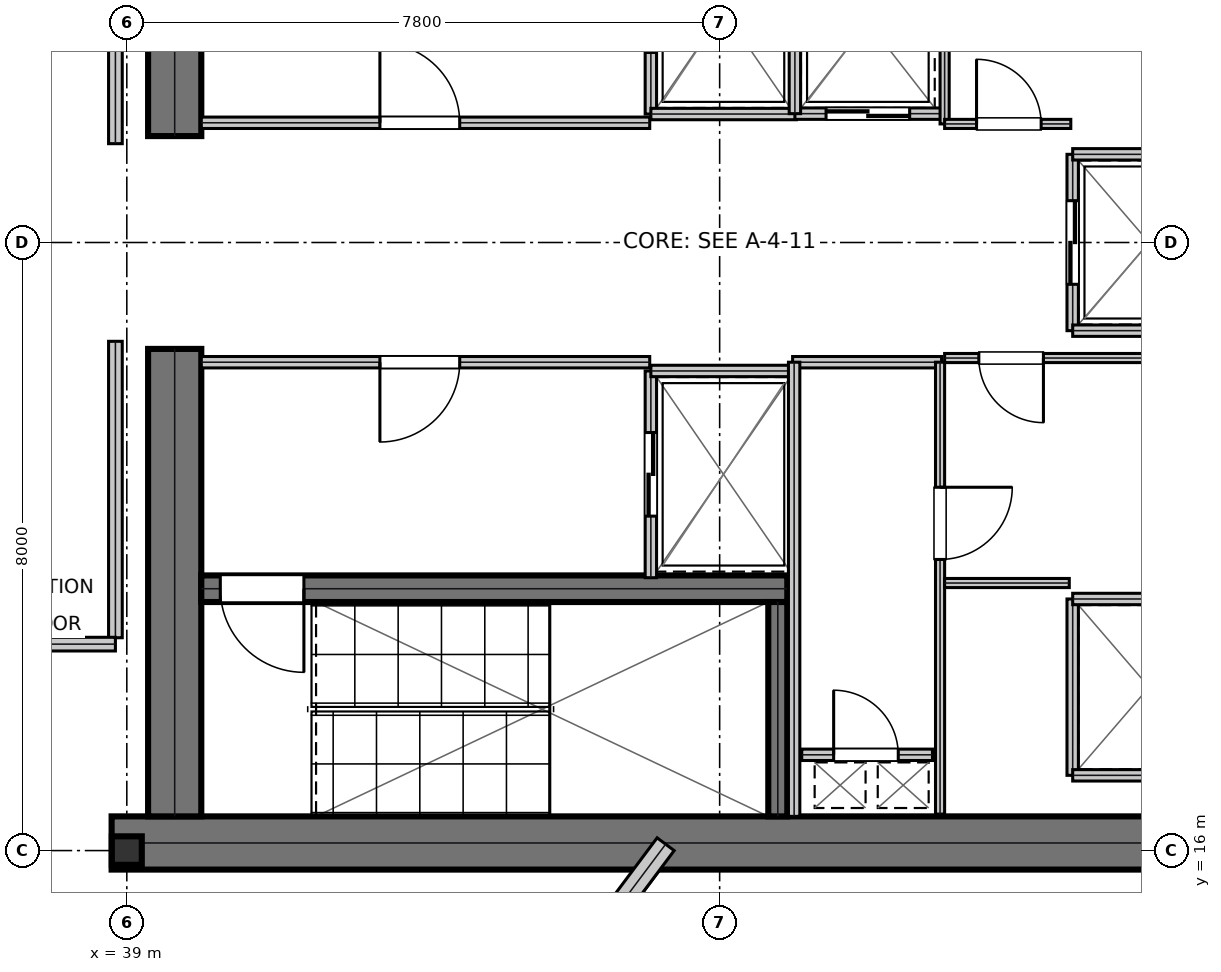
"""IFC4 building model, lengths in metres.
Left out: names, types, materials, properties, quantities, classifications, styles, units other than length and angle.
Written with IfcOpenShell. Run it as: python <this file> out.ifc"""

import sys

from ifc_helpers import new_model, si_unit, direction, frame, frame_2d, origin, origin_2d, place, context, subcontext, project, spatial, rectangle, i_section, extrude, element, fill, save


model = new_model("IFC4")
c1 = context("Model", 3, precision=1e-05, world=origin(), true_north=direction((0.0, 1.0)))
c2 = subcontext(c1, "Body", "Model", "MODEL_VIEW")
j1 = project(units=[si_unit("LENGTHUNIT", "METRE"), si_unit("PLANEANGLEUNIT", "RADIAN")], contexts=[c1])
p1 = place(None, origin())
s1 = spatial("IfcSite", under=j1, at=p1, CompositionType="ELEMENT")
p2 = place(p1, origin())
s2 = spatial("IfcBuilding", under=s1, at=p2, CompositionType="ELEMENT")
p3 = place(p2, frame((0.0, 0.0, 236.4)))
s3 = spatial("IfcBuildingStorey", under=s2, at=p3, CompositionType="ELEMENT", Elevation=236.4)
p4 = place(p3, frame((38.8, 16.1, 0.0), z_axis=(0.0, 0.0, 1.0), x_axis=(1.0, 0.0, 0.0)))
e1 = element("IfcWall", 1, at=p4, inside=s3, PredefinedType="SHEAR", context=c2, shape_type="SweptSolid", body=[
    extrude(rectangle(XDim=16.0, YDim=0.7, at=frame_2d((8.0, 0.0))), origin(), (0.0, 0.0, 1.0), 3.79),
])
for number, where, z_axis, x_axis in (
    (2, (39.63, 16.45, 0.0), (0.0, 0.0, 1.0), (0.0, 1.0, 0.0)),
    (3, (39.63, 25.4, 0.0), (0.0, 0.0, 1.0), (0.0, 1.0, 0.0)),
):
    element("IfcWall", number, at=place(p3, frame(where, z_axis=z_axis, x_axis=x_axis)), inside=s3, PredefinedType="SHEAR", context=c2, shape_type="SweptSolid", body=[
        extrude(rectangle(XDim=6.15, YDim=0.7, at=frame_2d((3.075, 0.0))), origin(), (0.0, 0.0, 1.0), 3.79),
    ])
p5 = place(p3, frame((39.98, 19.445, 0.0), z_axis=(0.0, 0.0, 1.0), x_axis=(1.0, 0.0, 0.0)))
e4 = element("IfcWall", 4, at=p5, inside=s3, PredefinedType="SHEAR", context=c2, shape_type="SweptSolid", body=[
    extrude(rectangle(XDim=7.71, YDim=0.35, at=frame_2d((3.855, 0.0))), origin(), (0.0, 0.0, 1.0), 3.79),
])
p6 = place(p5, frame((0.25, 0.0, 0.0)))
e5 = element("IfcOpeningElement", 5, at=p6, cuts=e4, PredefinedType="OPENING", context=c2, shape_type="SweptSolid", body=[
    extrude(rectangle(XDim=1.1, YDim=2.15, at=frame_2d((0.55, 1.075))), frame((0.0, 0.185, 0.0), z_axis=(0.0, -1.0, 0.0), x_axis=(1.0, 0.0, 0.0)), (0.0, 0.0, 1.0), 0.37),
])
p7 = place(p3, frame((47.565, 16.45, 0.0), z_axis=(0.0, 0.0, 1.0), x_axis=(0.0, 1.0, 0.0)))
e6 = element("IfcWall", 6, at=p7, inside=s3, PredefinedType="SHEAR", context=c2, shape_type="SweptSolid", body=[
    extrude(rectangle(XDim=2.82, YDim=0.25, at=frame_2d((1.41, 0.0))), origin(), (0.0, 0.0, 1.0), 3.79),
])
p8 = place(p3, frame((39.0, 16.0, 0.0), z_axis=(0.0, 0.0, 1.0), x_axis=(1.0, 0.0, 0.0)))
e7 = element("IfcColumn", 7, at=p8, inside=s3, PredefinedType="COLUMN", context=c2, shape_type="SweptSolid", body=[
    extrude(i_section(OverallWidth=0.394, OverallDepth=0.375, WebThickness=0.017, FlangeThickness=0.028, at=origin_2d()), origin(), (0.0, 0.0, 1.0), 4.044),
])
p9 = place(p3, frame((43.932, 13.2, 0.0), z_axis=(0.0, 0.0, 1.0), x_axis=(0.599012599487, 0.800739599156, 0.0)))
e8 = element("IfcWall", 8, at=p9, inside=s3, PredefinedType="STANDARD", context=c2, shape_type="SweptSolid", body=[
    extrude(rectangle(XDim=3.602, YDim=0.28, at=frame_2d((1.801, 0.0))), origin(), (0.0, 0.0, 1.0), 3.319),
])
p10 = place(p3, frame((39.98, 25.575, 0.0), z_axis=(0.0, 0.0, 1.0), x_axis=(1.0, 0.0, 0.0)))
e9 = element("IfcWall", 9, at=p10, inside=s3, PredefinedType="PARTITIONING", context=c2, shape_type="SweptSolid", body=[
    extrude(rectangle(XDim=5.9, YDim=0.15, at=frame_2d((2.95, 0.0))), origin(), (0.0, 0.0, 1.0), 3.79),
])
p11 = place(p10, frame((2.35, 0.0, 0.0)))
e10 = element("IfcOpeningElement", 10, at=p11, cuts=e9, PredefinedType="OPENING", context=c2, shape_type="SweptSolid", body=[
    extrude(rectangle(XDim=1.05, YDim=2.15, at=frame_2d((0.525, 1.075))), frame((0.0, 0.085, 0.0), z_axis=(0.0, -1.0, 0.0), x_axis=(1.0, 0.0, 0.0)), (0.0, 0.0, 1.0), 0.17),
])
p12 = place(p3, frame((39.98, 22.425, 0.0), z_axis=(0.0, 0.0, 1.0), x_axis=(1.0, 0.0, 0.0)))
e11 = element("IfcWall", 11, at=p12, inside=s3, PredefinedType="PARTITIONING", context=c2, shape_type="SweptSolid", body=[
    extrude(rectangle(XDim=5.9, YDim=0.15, at=frame_2d((2.95, 0.0))), origin(), (0.0, 0.0, 1.0), 3.79),
])
p13 = place(p12, frame((2.35, 0.0, 0.0)))
e12 = element("IfcOpeningElement", 12, at=p13, cuts=e11, PredefinedType="OPENING", context=c2, shape_type="SweptSolid", body=[
    extrude(rectangle(XDim=1.05, YDim=2.15, at=frame_2d((0.525, 1.075))), frame((0.0, 0.085, 0.0), z_axis=(0.0, -1.0, 0.0), x_axis=(1.0, 0.0, 0.0)), (0.0, 0.0, 1.0), 0.17),
])
p14 = place(p3, frame((45.895, 25.69, 0.0), z_axis=(0.0, 0.0, 1.0), x_axis=(0.0, 1.0, 0.0)))
e13 = element("IfcWall", 13, at=p14, inside=s3, PredefinedType="PARTITIONING", context=c2, shape_type="SweptSolid", body=[
    extrude(rectangle(XDim=2.72, YDim=0.15, at=frame_2d((1.36, 0.0))), origin(), (0.0, 0.0, 1.0), 3.79),
])
p15 = place(p14, frame((0.81, 0.0, 0.0)))
e14 = element("IfcOpeningElement", 14, at=p15, cuts=e13, PredefinedType="OPENING", context=c2, shape_type="SweptSolid", body=[
    extrude(rectangle(XDim=1.1, YDim=2.15, at=frame_2d((0.55, 1.075))), frame((0.0, 0.085, 0.0), z_axis=(0.0, -1.0, 0.0), x_axis=(1.0, 0.0, 0.0)), (0.0, 0.0, 1.0), 0.17),
])
p16 = place(p3, frame((45.895, 25.69, 0.0), z_axis=(0.0, 0.0, 1.0), x_axis=(1.0, 0.0, 0.0)))
e15 = element("IfcWall", 15, at=p16, inside=s3, PredefinedType="PARTITIONING", context=c2, shape_type="SweptSolid", body=[
    extrude(rectangle(XDim=1.915, YDim=0.15, at=frame_2d((0.958, 0.0))), origin(), (0.0, 0.0, 1.0), 3.79),
])
p17 = place(p3, frame((45.895, 19.59, 0.0), z_axis=(0.0, 0.0, 1.0), x_axis=(0.0, 1.0, 0.0)))
e16 = element("IfcWall", 16, at=p17, inside=s3, PredefinedType="PARTITIONING", context=c2, shape_type="SweptSolid", body=[
    extrude(rectangle(XDim=2.72, YDim=0.15, at=frame_2d((1.36, 0.0))), origin(), (0.0, 0.0, 1.0), 3.79),
])
p18 = place(p17, frame((0.81, 0.0, 0.0)))
e17 = element("IfcOpeningElement", 17, at=p18, cuts=e16, PredefinedType="OPENING", context=c2, shape_type="SweptSolid", body=[
    extrude(rectangle(XDim=1.1, YDim=2.15, at=frame_2d((0.55, 1.075))), frame((0.0, 0.085, 0.0), z_axis=(0.0, -1.0, 0.0), x_axis=(1.0, 0.0, 0.0)), (0.0, 0.0, 1.0), 0.17),
])
p19 = place(p3, frame((45.895, 22.31, 0.0), z_axis=(0.0, 0.0, 1.0), x_axis=(1.0, 0.0, 0.0)))
e18 = element("IfcWall", 18, at=p19, inside=s3, PredefinedType="PARTITIONING", context=c2, shape_type="SweptSolid", body=[
    extrude(rectangle(XDim=1.915, YDim=0.15, at=frame_2d((0.958, 0.0))), origin(), (0.0, 0.0, 1.0), 3.79),
])
p20 = place(p3, frame((47.79, 25.695, 0.0), z_axis=(0.0, 0.0, 1.0), x_axis=(1.0, 0.0, 0.0)))
e19 = element("IfcWall", 19, at=p20, inside=s3, PredefinedType="PARTITIONING", context=c2, shape_type="SweptSolid", body=[
    extrude(rectangle(XDim=1.92, YDim=0.15, at=frame_2d((0.96, 0.0))), origin(), (0.0, 0.0, 1.0), 3.79),
])
p21 = place(p20, frame((0.41, 0.0, 0.0)))
e20 = element("IfcOpeningElement", 20, at=p21, cuts=e19, PredefinedType="OPENING", context=c2, shape_type="SweptSolid", body=[
    extrude(rectangle(XDim=1.1, YDim=2.15, at=frame_2d((0.55, 1.075))), frame((0.0, 0.085, 0.0), z_axis=(0.0, -1.0, 0.0), x_axis=(1.0, 0.0, 0.0)), (0.0, 0.0, 1.0), 0.17),
])
p22 = place(p3, frame((47.79, 25.695, 0.0), z_axis=(0.0, 0.0, 1.0), x_axis=(0.0, 1.0, 0.0)))
e21 = element("IfcWall", 21, at=p22, inside=s3, PredefinedType="PARTITIONING", context=c2, shape_type="SweptSolid", body=[
    extrude(rectangle(XDim=2.415, YDim=0.15, at=frame_2d((1.208, 0.0))), origin(), (0.0, 0.0, 1.0), 3.79),
])
p23 = place(p3, frame((51.445, 22.84, 0.0), z_axis=(0.0, 0.0, 1.0), x_axis=(0.0, 1.0, 0.0)))
e22 = element("IfcWall", 22, at=p23, inside=s3, PredefinedType="PARTITIONING", context=c2, shape_type="SweptSolid", body=[
    extrude(rectangle(XDim=2.32, YDim=0.15, at=frame_2d((1.16, 0.0))), origin(), (0.0, 0.0, 1.0), 3.79),
])
p24 = place(p23, frame((0.61, 0.0, 0.0)))
e23 = element("IfcOpeningElement", 23, at=p24, cuts=e22, PredefinedType="OPENING", context=c2, shape_type="SweptSolid", body=[
    extrude(rectangle(XDim=1.1, YDim=2.15, at=frame_2d((0.55, 1.075))), frame((0.0, 0.085, 0.0), z_axis=(0.0, -1.0, 0.0), x_axis=(1.0, 0.0, 0.0)), (0.0, 0.0, 1.0), 0.17),
])
for number, where, z_axis, x_axis in (
    (24, (51.445, 22.84, 0.0), (0.0, 0.0, 1.0), (1.0, 0.0, 0.0)),
    (25, (51.445, 25.16, 0.0), (0.0, 0.0, 1.0), (1.0, 0.0, 0.0)),
):
    element("IfcWall", number, at=place(p3, frame(where, z_axis=z_axis, x_axis=x_axis)), inside=s3, PredefinedType="PARTITIONING", context=c2, shape_type="SweptSolid", body=[
        extrude(rectangle(XDim=2.015, YDim=0.15, at=frame_2d((1.007, 0.0))), origin(), (0.0, 0.0, 1.0), 3.79),
    ])
p25 = place(p3, frame((51.445, 16.99, 0.0), z_axis=(0.0, 0.0, 1.0), x_axis=(0.0, 1.0, 0.0)))
e26 = element("IfcWall", 26, at=p25, inside=s3, PredefinedType="PARTITIONING", context=c2, shape_type="SweptSolid", body=[
    extrude(rectangle(XDim=2.32, YDim=0.15, at=frame_2d((1.16, 0.0))), origin(), (0.0, 0.0, 1.0), 3.79),
])
for number, where, z_axis, x_axis in (
    (27, (51.445, 16.99, 0.0), (0.0, 0.0, 1.0), (1.0, 0.0, 0.0)),
    (28, (51.445, 19.31, 0.0), (0.0, 0.0, 1.0), (1.0, 0.0, 0.0)),
):
    element("IfcWall", number, at=place(p3, frame(where, z_axis=z_axis, x_axis=x_axis)), inside=s3, PredefinedType="PARTITIONING", context=c2, shape_type="SweptSolid", body=[
        extrude(rectangle(XDim=2.015, YDim=0.15, at=frame_2d((1.007, 0.0))), origin(), (0.0, 0.0, 1.0), 3.79),
    ])
p26 = place(p3, frame((47.88, 17.26, 0.0), z_axis=(0.0, 0.0, 1.0), x_axis=(1.0, 0.0, 0.0)))
e29 = element("IfcWall", 29, at=p26, inside=s3, PredefinedType="PARTITIONING", context=c2, shape_type="SweptSolid", body=[
    extrude(rectangle(XDim=1.72, YDim=0.15, at=frame_2d((0.86, 0.0))), origin(), (0.0, 0.0, 1.0), 3.79),
])
p27 = place(p26, frame((0.42, 0.0, 0.0)))
e30 = element("IfcOpeningElement", 30, at=p27, cuts=e29, PredefinedType="OPENING", context=c2, shape_type="SweptSolid", body=[
    extrude(rectangle(XDim=0.85, YDim=2.15, at=frame_2d((0.425, 1.075))), frame((0.0, 0.085, 0.0), z_axis=(0.0, -1.0, 0.0), x_axis=(1.0, 0.0, 0.0)), (0.0, 0.0, 1.0), 0.17),
])
p28 = place(p3, frame((47.76, 22.425, 0.0), z_axis=(0.0, 0.0, 1.0), x_axis=(1.0, 0.0, 0.0)))
e31 = element("IfcWall", 31, at=p28, inside=s3, PredefinedType="PARTITIONING", context=c2, shape_type="SweptSolid", body=[
    extrude(rectangle(XDim=1.96, YDim=0.15, at=frame_2d((0.98, 0.0))), origin(), (0.0, 0.0, 1.0), 3.79),
])
p29 = place(p3, frame((47.78, 16.45, 0.0), z_axis=(0.0, 0.0, 1.0), x_axis=(0.0, 1.0, 0.0)))
e32 = element("IfcWall", 32, at=p29, inside=s3, PredefinedType="PARTITIONING", context=c2, shape_type="SweptSolid", body=[
    extrude(rectangle(XDim=5.975, YDim=0.15, at=frame_2d((2.988, 0.0))), origin(), (0.0, 0.0, 1.0), 3.79),
])
p30 = place(p3, frame((49.7, 16.48, 0.0), z_axis=(0.0, 0.0, 1.0), x_axis=(0.0, 1.0, 0.0)))
e33 = element("IfcWall", 33, at=p30, inside=s3, PredefinedType="PARTITIONING", context=c2, shape_type="SweptSolid", body=[
    extrude(rectangle(XDim=5.945, YDim=0.12, at=frame_2d((2.973, 0.0))), origin(), (0.0, 0.0, 1.0), 3.79),
])
p31 = place(p30, frame((3.35, 0.0, 0.0)))
e34 = element("IfcOpeningElement", 34, at=p31, cuts=e33, PredefinedType="OPENING", context=c2, shape_type="SweptSolid", body=[
    extrude(rectangle(XDim=0.95, YDim=2.15, at=frame_2d((0.475, 1.075))), frame((0.0, 0.07, 0.0), z_axis=(0.0, -1.0, 0.0), x_axis=(1.0, 0.0, 0.0)), (0.0, 0.0, 1.0), 0.14),
])
p32 = place(p3, frame((49.76, 22.48, 0.0), z_axis=(0.0, 0.0, 1.0), x_axis=(1.0, 0.0, 0.0)))
e35 = element("IfcWall", 35, at=p32, inside=s3, PredefinedType="PARTITIONING", context=c2, shape_type="SweptSolid", body=[
    extrude(rectangle(XDim=3.9, YDim=0.12, at=frame_2d((1.95, 0.0))), origin(), (0.0, 0.0, 1.0), 3.79),
])
p33 = place(p32, frame((0.45, 0.0, 0.0)))
e36 = element("IfcOpeningElement", 36, at=p33, cuts=e35, PredefinedType="OPENING", context=c2, shape_type="SweptSolid", body=[
    extrude(rectangle(XDim=0.85, YDim=2.15, at=frame_2d((0.425, 1.075))), frame((0.0, 0.07, 0.0), z_axis=(0.0, -1.0, 0.0), x_axis=(1.0, 0.0, 0.0)), (0.0, 0.0, 1.0), 0.14),
])
p34 = place(p3, frame((49.76, 19.52, 0.0), z_axis=(0.0, 0.0, 1.0), x_axis=(1.0, 0.0, 0.0)))
e37 = element("IfcWall", 37, at=p34, inside=s3, PredefinedType="PARTITIONING", context=c2, shape_type="SweptSolid", body=[
    extrude(rectangle(XDim=1.64, YDim=0.12, at=frame_2d((0.82, 0.0))), origin(), (0.0, 0.0, 1.0), 3.79),
])
p35 = place(p3, frame((49.76, 25.56, 0.0), z_axis=(0.0, 0.0, 1.0), x_axis=(0.0, 1.0, 0.0)))
e38 = element("IfcWall", 38, at=p35, inside=s3, PredefinedType="PARTITIONING", context=c2, shape_type="SweptSolid", body=[
    extrude(rectangle(XDim=2.66, YDim=0.12, at=frame_2d((1.33, 0.0))), origin(), (0.0, 0.0, 1.0), 3.79),
])
p36 = place(p3, frame((49.76, 25.56, 0.0), z_axis=(0.0, 0.0, 1.0), x_axis=(1.0, 0.0, 0.0)))
e39 = element("IfcWall", 39, at=p36, inside=s3, PredefinedType="PARTITIONING", context=c2, shape_type="SweptSolid", body=[
    extrude(rectangle(XDim=1.66, YDim=0.12, at=frame_2d((0.83, 0.0))), origin(), (0.0, 0.0, 1.0), 3.79),
])
p37 = place(p36, frame((0.42, 0.0, 0.0)))
e40 = element("IfcOpeningElement", 40, at=p37, cuts=e39, PredefinedType="OPENING", context=c2, shape_type="SweptSolid", body=[
    extrude(rectangle(XDim=0.85, YDim=2.15, at=frame_2d((0.425, 1.075))), frame((0.0, 0.07, 0.0), z_axis=(0.0, -1.0, 0.0), x_axis=(1.0, 0.0, 0.0)), (0.0, 0.0, 1.0), 0.14),
])
p38 = place(p3, frame((38.85, 18.8, 0.0), z_axis=(0.0, 0.0, 1.0), x_axis=(0.0, 1.0, 0.0)))
e41 = element("IfcWall", 41, at=p38, inside=s3, PredefinedType="SOLIDWALL", context=c2, shape_type="SweptSolid", body=[
    extrude(rectangle(XDim=3.9, YDim=0.18, at=frame_2d((1.95, 0.0))), origin(), (0.0, 0.0, 1.0), 3.468),
])
p39 = place(p3, frame((37.1, 18.716, 0.0), z_axis=(0.0, 0.0, 1.0), x_axis=(1.0, 0.0, 0.0)))
e42 = element("IfcWall", 42, at=p39, inside=s3, PredefinedType="SOLIDWALL", context=c2, shape_type="SweptSolid", body=[
    extrude(rectangle(XDim=1.75, YDim=0.18, at=frame_2d((0.875, 0.0))), origin(), (0.0, 0.0, 1.0), 3.79),
])
p40 = place(p3, frame((38.85, 25.3, 0.0), z_axis=(0.0, 0.0, 1.0), x_axis=(0.0, 1.0, 0.0)))
e43 = element("IfcWall", 43, at=p40, inside=s3, PredefinedType="SOLIDWALL", context=c2, shape_type="SweptSolid", body=[
    extrude(rectangle(XDim=8.2, YDim=0.18, at=frame_2d((4.1, 0.0))), origin(), (0.0, 0.0, 1.0), 3.241),
])
p41 = place(p11, origin())
e44 = element("IfcDoor", 44, at=p41, inside=s3, OperationType="SINGLE_SWING_LEFT", PredefinedType="DOOR", context=c2, shape_type="SweptSolid", body=[
    extrude(rectangle(XDim=1.05, YDim=2.15, at=frame_2d((0.525, 1.075))), frame((0.0, 0.025, 0.0), z_axis=(0.0, -1.0, 0.0), x_axis=(1.0, 0.0, 0.0)), (0.0, 0.0, 1.0), 0.05),
])
fill(e10, e44)
p42 = place(p13, frame((1.05, 0.0, 0.0), z_axis=(0.0, 0.0, 1.0), x_axis=(-1.0, 0.0, 0.0)))
e45 = element("IfcDoor", 45, at=p42, inside=s3, OperationType="SINGLE_SWING_RIGHT", PredefinedType="DOOR", context=c2, shape_type="SweptSolid", body=[
    extrude(rectangle(XDim=1.05, YDim=2.15, at=frame_2d((0.525, 1.075))), frame((0.0, 0.025, 0.0), z_axis=(0.0, -1.0, 0.0), x_axis=(1.0, 0.0, 0.0)), (0.0, 0.0, 1.0), 0.05),
])
fill(e12, e45)
p43 = place(p18, frame((1.1, 0.0, 0.0), z_axis=(0.0, 0.0, 1.0), x_axis=(-1.0, 0.0, 0.0)))
e46 = element("IfcDoor", 46, at=p43, inside=s3, OperationType="DOUBLE_DOOR_SLIDING", PredefinedType="DOOR", context=c2, shape_type="SweptSolid", body=[
    extrude(rectangle(XDim=1.1, YDim=2.15, at=frame_2d((0.55, 1.075))), frame((0.0, 0.025, 0.0), z_axis=(0.0, -1.0, 0.0), x_axis=(1.0, 0.0, 0.0)), (0.0, 0.0, 1.0), 0.05),
])
fill(e17, e46)
p44 = place(p21, frame((1.1, 0.0, 0.0), z_axis=(0.0, 0.0, 1.0), x_axis=(-1.0, 0.0, 0.0)))
e47 = element("IfcDoor", 47, at=p44, inside=s3, OperationType="DOUBLE_DOOR_SLIDING", PredefinedType="DOOR", context=c2, shape_type="SweptSolid", body=[
    extrude(rectangle(XDim=1.1, YDim=2.15, at=frame_2d((0.55, 1.075))), frame((0.0, 0.025, 0.0), z_axis=(0.0, -1.0, 0.0), x_axis=(1.0, 0.0, 0.0)), (0.0, 0.0, 1.0), 0.05),
])
fill(e20, e47)
p45 = place(p24, frame((1.1, 0.0, 0.0), z_axis=(0.0, 0.0, 1.0), x_axis=(-1.0, 0.0, 0.0)))
e48 = element("IfcDoor", 48, at=p45, inside=s3, OperationType="DOUBLE_DOOR_SLIDING", PredefinedType="DOOR", context=c2, shape_type="SweptSolid", body=[
    extrude(rectangle(XDim=1.1, YDim=2.15, at=frame_2d((0.55, 1.075))), frame((0.0, 0.025, 0.0), z_axis=(0.0, -1.0, 0.0), x_axis=(1.0, 0.0, 0.0)), (0.0, 0.0, 1.0), 0.05),
])
fill(e23, e48)
p46 = place(p27, origin())
e49 = element("IfcDoor", 49, at=p46, inside=s3, OperationType="SINGLE_SWING_LEFT", PredefinedType="TRAPDOOR", context=c2, shape_type="SweptSolid", body=[
    extrude(rectangle(XDim=0.85, YDim=2.15, at=frame_2d((0.425, 1.075))), frame((0.0, 0.025, 0.0), z_axis=(0.0, -1.0, 0.0), x_axis=(1.0, 0.0, 0.0)), (0.0, 0.0, 1.0), 0.05),
])
fill(e30, e49)
p47 = place(p31, frame((0.95, 0.0, 0.0), z_axis=(0.0, 0.0, 1.0), x_axis=(-1.0, 0.0, 0.0)))
e50 = element("IfcDoor", 50, at=p47, inside=s3, OperationType="SINGLE_SWING_LEFT", PredefinedType="DOOR", context=c2, shape_type="SweptSolid", body=[
    extrude(rectangle(XDim=0.95, YDim=2.15, at=frame_2d((0.475, 1.075))), frame((0.0, 0.025, 0.0), z_axis=(0.0, -1.0, 0.0), x_axis=(1.0, 0.0, 0.0)), (0.0, 0.0, 1.0), 0.05),
])
fill(e34, e50)
p48 = place(p33, frame((0.85, 0.0, 0.0), z_axis=(0.0, 0.0, 1.0), x_axis=(-1.0, 0.0, 0.0)))
e51 = element("IfcDoor", 51, at=p48, inside=s3, OperationType="SINGLE_SWING_LEFT", PredefinedType="DOOR", context=c2, shape_type="SweptSolid", body=[
    extrude(rectangle(XDim=0.85, YDim=2.15, at=frame_2d((0.425, 1.075))), frame((0.0, 0.025, 0.0), z_axis=(0.0, -1.0, 0.0), x_axis=(1.0, 0.0, 0.0)), (0.0, 0.0, 1.0), 0.05),
])
fill(e36, e51)
p49 = place(p37, origin())
e52 = element("IfcDoor", 52, at=p49, inside=s3, OperationType="SINGLE_SWING_LEFT", PredefinedType="DOOR", context=c2, shape_type="SweptSolid", body=[
    extrude(rectangle(XDim=0.85, YDim=2.15, at=frame_2d((0.425, 1.075))), frame((0.0, 0.025, 0.0), z_axis=(0.0, -1.0, 0.0), x_axis=(1.0, 0.0, 0.0)), (0.0, 0.0, 1.0), 0.05),
])
fill(e40, e52)
p50 = place(p6, frame((1.1, 0.0, 0.0), z_axis=(0.0, 0.0, 1.0), x_axis=(-1.0, 0.0, 0.0)))
e53 = element("IfcDoor", 53, at=p50, inside=s3, OperationType="SINGLE_SWING_LEFT", PredefinedType="DOOR", context=c2, shape_type="SweptSolid", body=[
    extrude(rectangle(XDim=1.1, YDim=2.15, at=frame_2d((0.55, 1.075))), frame((0.0, 0.025, 0.0), z_axis=(0.0, -1.0, 0.0), x_axis=(1.0, 0.0, 0.0)), (0.0, 0.0, 1.0), 0.05),
])
fill(e5, e53)
save(model, sys.argv[1])
